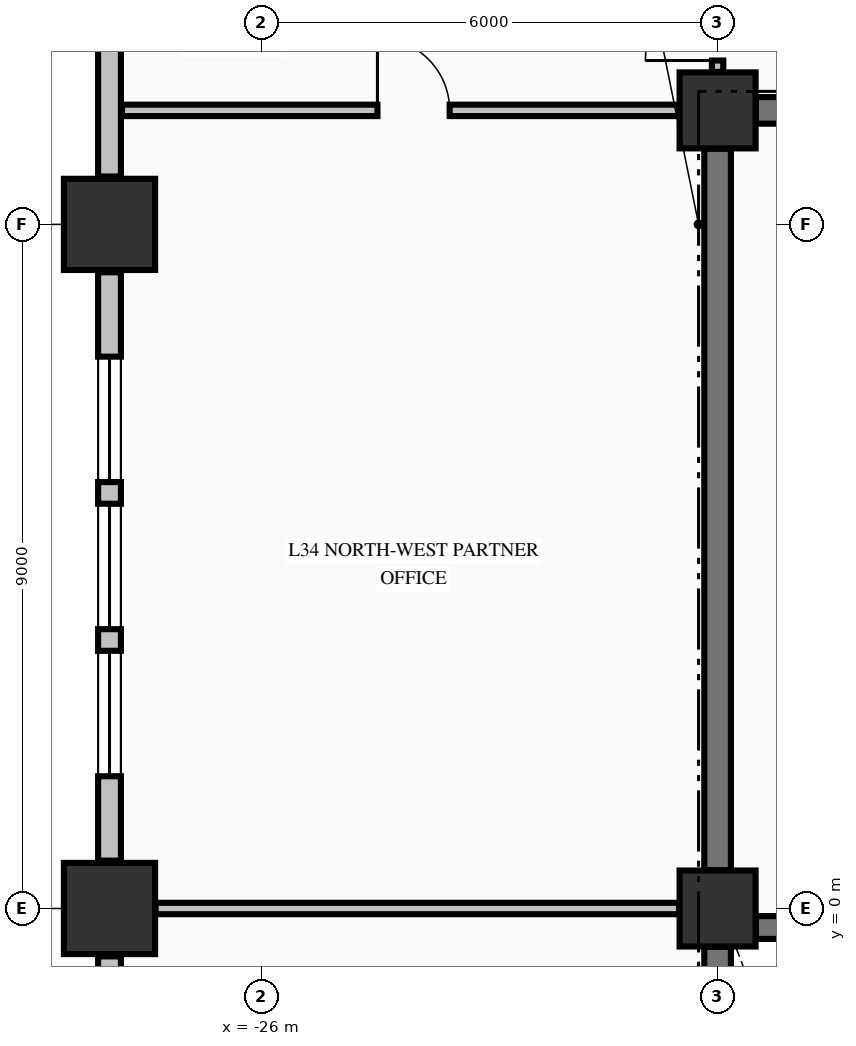
"""IFC4 building model, lengths in metres.
Left out: names, types, materials, properties, quantities, classifications, styles, units other than length and angle.
Written with IfcOpenShell. Run it as: python <this file> out.ifc"""

import sys

from ifc_helpers import new_model, si_unit, direction, frame, frame_2d, origin, origin_2d, place, context, subcontext, project, spatial, rectangle, extrude, element, fill, save


model = new_model("IFC4")
c1 = context("Model", 3, precision=1e-05, world=origin(), true_north=direction((0.0, 1.0)))
c2 = subcontext(c1, "Body", "Model", "MODEL_VIEW")
j1 = project(units=[si_unit("LENGTHUNIT", "METRE"), si_unit("PLANEANGLEUNIT", "RADIAN")], contexts=[c1])
p1 = place(None, origin())
s1 = spatial("IfcSite", under=j1, at=p1, CompositionType="ELEMENT")
p2 = place(p1, origin())
s2 = spatial("IfcBuilding", under=s1, at=p2, CompositionType="ELEMENT")
p3 = place(p2, frame((0.0, 0.0, 135.63)))
s3 = spatial("IfcBuildingStorey", under=s2, at=p3, CompositionType="ELEMENT", Elevation=135.63)
for number, where, z_axis, x_axis in (
    (1, (-28.0, 0.0, -0.25), (0.0, 0.0, 1.0), (1.0, 0.0, 0.0)),
    (2, (-28.0, 9.0, -0.25), (0.0, 0.0, 1.0), (1.0, 0.0, 0.0)),
):
    element("IfcColumn", number, at=place(p3, frame(where, z_axis=z_axis, x_axis=x_axis)), inside=s3, PredefinedType="COLUMN", context=c2, shape_type="SweptSolid", body=[
        extrude(rectangle(XDim=1.2, YDim=1.2, at=origin_2d()), origin(), (0.0, 0.0, 1.0), 3.57),
    ])
for number, where, z_axis, x_axis in (
    (3, (-20.0, 10.5, -0.25), (0.0, 0.0, 1.0), (1.0, 0.0, 0.0)),
    (4, (-20.0, 0.0, -0.25), (0.0, 0.0, 1.0), (1.0, 0.0, 0.0)),
):
    element("IfcColumn", number, at=place(p3, frame(where, z_axis=z_axis, x_axis=x_axis)), inside=s3, PredefinedType="COLUMN", context=c2, shape_type="SweptSolid", body=[
        extrude(rectangle(XDim=1.0, YDim=1.0, at=origin_2d()), origin(), (0.0, 0.0, 1.0), 3.57),
    ])
p4 = place(p3, frame((-28.0, -0.63, 0.0), z_axis=(0.0, 0.0, 1.0), x_axis=(0.0, -1.0, 0.0)))
e5 = element("IfcWall", 5, at=p4, inside=s3, PredefinedType="STANDARD", context=c2, shape_type="SweptSolid", body=[
    extrude(rectangle(XDim=7.74, YDim=0.3, at=frame_2d((3.87, 0.0))), origin(), (0.0, 0.0, 1.0), 2.712),
])
p5 = place(p4, frame((1.11, 0.0, 0.8)))
e6 = element("IfcOpeningElement", 6, at=p5, cuts=e5, PredefinedType="OPENING", context=c2, shape_type="SweptSolid", body=[
    extrude(rectangle(XDim=1.65, YDim=1.7, at=frame_2d((0.825, 0.85))), frame((0.0, 0.16, 0.0), z_axis=(0.0, -1.0, 0.0), x_axis=(1.0, 0.0, 0.0)), (0.0, 0.0, 1.0), 0.32),
])
p6 = place(p4, frame((3.045, 0.0, 0.8)))
e7 = element("IfcOpeningElement", 7, at=p6, cuts=e5, PredefinedType="OPENING", context=c2, shape_type="SweptSolid", body=[
    extrude(rectangle(XDim=1.65, YDim=1.7, at=frame_2d((0.825, 0.85))), frame((0.0, 0.16, 0.0), z_axis=(0.0, -1.0, 0.0), x_axis=(1.0, 0.0, 0.0)), (0.0, 0.0, 1.0), 0.32),
])
p7 = place(p4, frame((4.98, 0.0, 0.8)))
e8 = element("IfcOpeningElement", 8, at=p7, cuts=e5, PredefinedType="OPENING", context=c2, shape_type="SweptSolid", body=[
    extrude(rectangle(XDim=1.65, YDim=1.7, at=frame_2d((0.825, 0.85))), frame((0.0, 0.16, 0.0), z_axis=(0.0, -1.0, 0.0), x_axis=(1.0, 0.0, 0.0)), (0.0, 0.0, 1.0), 0.32),
])
p8 = place(p3, frame((-28.0, 8.37, 0.0), z_axis=(0.0, 0.0, 1.0), x_axis=(0.0, -1.0, 0.0)))
e9 = element("IfcWall", 9, at=p8, inside=s3, PredefinedType="STANDARD", context=c2, shape_type="SweptSolid", body=[
    extrude(rectangle(XDim=7.74, YDim=0.3, at=frame_2d((3.87, 0.0))), origin(), (0.0, 0.0, 1.0), 2.712),
])
p9 = place(p8, frame((1.11, 0.0, 0.8)))
e10 = element("IfcOpeningElement", 10, at=p9, cuts=e9, PredefinedType="OPENING", context=c2, shape_type="SweptSolid", body=[
    extrude(rectangle(XDim=1.65, YDim=1.7, at=frame_2d((0.825, 0.85))), frame((0.0, 0.16, 0.0), z_axis=(0.0, -1.0, 0.0), x_axis=(1.0, 0.0, 0.0)), (0.0, 0.0, 1.0), 0.32),
])
p10 = place(p8, frame((3.045, 0.0, 0.8)))
e11 = element("IfcOpeningElement", 11, at=p10, cuts=e9, PredefinedType="OPENING", context=c2, shape_type="SweptSolid", body=[
    extrude(rectangle(XDim=1.65, YDim=1.7, at=frame_2d((0.825, 0.85))), frame((0.0, 0.16, 0.0), z_axis=(0.0, -1.0, 0.0), x_axis=(1.0, 0.0, 0.0)), (0.0, 0.0, 1.0), 0.32),
])
p11 = place(p8, frame((4.98, 0.0, 0.8)))
e12 = element("IfcOpeningElement", 12, at=p11, cuts=e9, PredefinedType="OPENING", context=c2, shape_type="SweptSolid", body=[
    extrude(rectangle(XDim=1.65, YDim=1.7, at=frame_2d((0.825, 0.85))), frame((0.0, 0.16, 0.0), z_axis=(0.0, -1.0, 0.0), x_axis=(1.0, 0.0, 0.0)), (0.0, 0.0, 1.0), 0.32),
])
p12 = place(p3, frame((-28.0, 20.37, 0.0), z_axis=(0.0, 0.0, 1.0), x_axis=(0.0, -1.0, 0.0)))
e13 = element("IfcWall", 13, at=p12, inside=s3, PredefinedType="STANDARD", context=c2, shape_type="SweptSolid", body=[
    extrude(rectangle(XDim=10.74, YDim=0.3, at=frame_2d((5.37, 0.0))), origin(), (0.0, 0.0, 1.0), 2.712),
])
p13 = place(p3, frame((-19.496, -0.25, 0.0), z_axis=(0.0, 0.0, 1.0), x_axis=(1.0, 0.0, 0.0)))
e14 = element("IfcWall", 14, at=p13, inside=s3, PredefinedType="SHEAR", context=c2, shape_type="SweptSolid", body=[
    extrude(rectangle(XDim=7.992, YDim=0.3, at=frame_2d((3.996, 0.0))), origin(), (0.0, 0.0, 1.0), 3.32),
])
p14 = place(p13, frame((5.796, 0.0, 0.0)))
e15 = element("IfcOpeningElement", 15, at=p14, cuts=e14, PredefinedType="OPENING", context=c2, shape_type="SweptSolid", body=[
    extrude(rectangle(XDim=1.1, YDim=2.15, at=frame_2d((0.55, 1.075))), frame((0.0, 0.16, 0.0), z_axis=(0.0, -1.0, 0.0), x_axis=(1.0, 0.0, 0.0)), (0.0, 0.0, 1.0), 0.32),
])
p15 = place(p3, frame((-19.496, 10.5, 0.0), z_axis=(0.0, 0.0, 1.0), x_axis=(1.0, 0.0, 0.0)))
e16 = element("IfcWall", 16, at=p15, inside=s3, PredefinedType="SHEAR", context=c2, shape_type="SweptSolid", body=[
    extrude(rectangle(XDim=4.796, YDim=0.35, at=frame_2d((2.398, 0.0))), origin(), (0.0, 0.0, 1.0), 3.32),
])
p16 = place(p15, frame((1.621, 0.0, 0.0)))
e17 = element("IfcOpeningElement", 17, at=p16, cuts=e16, PredefinedType="OPENING", context=c2, shape_type="SweptSolid", body=[
    extrude(rectangle(XDim=1.05, YDim=2.15, at=frame_2d((0.525, 1.075))), frame((0.0, 0.185, 0.0), z_axis=(0.0, -1.0, 0.0), x_axis=(1.0, 0.0, 0.0)), (0.0, 0.0, 1.0), 0.37),
])
p17 = place(p3, frame((-27.394, 0.0, 0.0), z_axis=(0.0, 0.0, 1.0), x_axis=(1.0, 0.0, 0.0)))
e18 = element("IfcWall", 18, at=p17, inside=s3, PredefinedType="PARTITIONING", context=c2, shape_type="SweptSolid", body=[
    extrude(rectangle(XDim=6.888, YDim=0.15, at=frame_2d((3.444, 0.0))), origin(), (0.0, 0.0, 1.0), 2.81),
])
p18 = place(p3, frame((-27.835, 10.5, 0.0), z_axis=(0.0, 0.0, 1.0), x_axis=(1.0, 0.0, 0.0)))
e19 = element("IfcWall", 19, at=p18, inside=s3, PredefinedType="PARTITIONING", context=c2, shape_type="SweptSolid", body=[
    extrude(rectangle(XDim=7.329, YDim=0.15, at=frame_2d((3.665, 0.0))), origin(), (0.0, 0.0, 1.0), 3.32),
])
p19 = place(p18, frame((3.36, 0.0, 0.0)))
e20 = element("IfcOpeningElement", 20, at=p19, cuts=e19, PredefinedType="OPENING", context=c2, shape_type="SweptSolid", body=[
    extrude(rectangle(XDim=0.95, YDim=2.15, at=frame_2d((0.475, 1.075))), frame((0.0, 0.085, 0.0), z_axis=(0.0, -1.0, 0.0), x_axis=(1.0, 0.0, 0.0)), (0.0, 0.0, 1.0), 0.17),
])
p20 = place(p3, frame((-20.0, -9.446, 0.0), z_axis=(0.0, 0.0, 1.0), x_axis=(0.0, 1.0, 0.0)))
e21 = element("IfcWall", 21, at=p20, inside=s3, PredefinedType="SHEAR", context=c2, shape_type="SweptSolid", body=[
    extrude(rectangle(XDim=8.942, YDim=0.35, at=frame_2d((4.471, 0.0))), origin(), (0.0, 0.0, 1.0), 3.32),
])
p21 = place(p3, frame((-20.0, 0.504, 0.0), z_axis=(0.0, 0.0, 1.0), x_axis=(0.0, 1.0, 0.0)))
e22 = element("IfcWall", 22, at=p21, inside=s3, PredefinedType="SHEAR", context=c2, shape_type="SweptSolid", body=[
    extrude(rectangle(XDim=9.492, YDim=0.35, at=frame_2d((4.746, 0.0))), origin(), (0.0, 0.0, 1.0), 3.32),
])
p22 = place(p3, frame((-20.0, 11.006, 0.0), z_axis=(0.0, 0.0, 1.0), x_axis=(0.0, 1.0, 0.0)))
e23 = element("IfcWall", 23, at=p22, inside=s3, PredefinedType="PARTITIONING", context=c2, shape_type="SweptSolid", body=[
    extrude(rectangle(XDim=1.466, YDim=0.15, at=frame_2d((0.733, 0.0))), origin(), (0.0, 0.0, 1.0), 2.81),
])
p23 = place(p22, frame((0.15, 0.0, 0.0)))
e24 = element("IfcOpeningElement", 24, at=p23, cuts=e23, PredefinedType="OPENING", context=c2, shape_type="SweptSolid", body=[
    extrude(rectangle(XDim=0.95, YDim=2.15, at=frame_2d((0.475, 1.075))), frame((0.0, 0.085, 0.0), z_axis=(0.0, -1.0, 0.0), x_axis=(1.0, 0.0, 0.0)), (0.0, 0.0, 1.0), 0.17),
])
p24 = place(p9, origin())
e25 = element("IfcWindow", 25, at=p24, inside=s3, PartitioningType="SINGLE_PANEL", PredefinedType="WINDOW", context=c2, shape_type="SweptSolid", body=[
    extrude(rectangle(XDim=1.65, YDim=1.7, at=frame_2d((0.825, 0.85))), frame((0.0, 0.03, 0.0), z_axis=(0.0, -1.0, 0.0), x_axis=(1.0, 0.0, 0.0)), (0.0, 0.0, 1.0), 0.06),
])
fill(e10, e25)
p25 = place(p10, origin())
e26 = element("IfcWindow", 26, at=p25, inside=s3, PartitioningType="SINGLE_PANEL", PredefinedType="WINDOW", context=c2, shape_type="SweptSolid", body=[
    extrude(rectangle(XDim=1.65, YDim=1.7, at=frame_2d((0.825, 0.85))), frame((0.0, 0.03, 0.0), z_axis=(0.0, -1.0, 0.0), x_axis=(1.0, 0.0, 0.0)), (0.0, 0.0, 1.0), 0.06),
])
fill(e11, e26)
p26 = place(p11, origin())
e27 = element("IfcWindow", 27, at=p26, inside=s3, PartitioningType="SINGLE_PANEL", PredefinedType="WINDOW", context=c2, shape_type="SweptSolid", body=[
    extrude(rectangle(XDim=1.65, YDim=1.7, at=frame_2d((0.825, 0.85))), frame((0.0, 0.03, 0.0), z_axis=(0.0, -1.0, 0.0), x_axis=(1.0, 0.0, 0.0)), (0.0, 0.0, 1.0), 0.06),
])
fill(e12, e27)
p27 = place(p23, origin())
e28 = element("IfcDoor", 28, at=p27, inside=s3, OperationType="SINGLE_SWING_LEFT", PredefinedType="DOOR", context=c2, shape_type="SweptSolid", body=[
    extrude(rectangle(XDim=0.95, YDim=2.15, at=frame_2d((0.475, 1.075))), frame((0.0, 0.025, 0.0), z_axis=(0.0, -1.0, 0.0), x_axis=(1.0, 0.0, 0.0)), (0.0, 0.0, 1.0), 0.05),
])
fill(e24, e28)
p28 = place(p19, origin())
e29 = element("IfcDoor", 29, at=p28, inside=s3, OperationType="SINGLE_SWING_LEFT", PredefinedType="DOOR", context=c2, shape_type="SweptSolid", body=[
    extrude(rectangle(XDim=0.95, YDim=2.15, at=frame_2d((0.475, 1.075))), frame((0.0, 0.025, 0.0), z_axis=(0.0, -1.0, 0.0), x_axis=(1.0, 0.0, 0.0)), (0.0, 0.0, 1.0), 0.05),
])
fill(e20, e29)
save(model, sys.argv[1])
